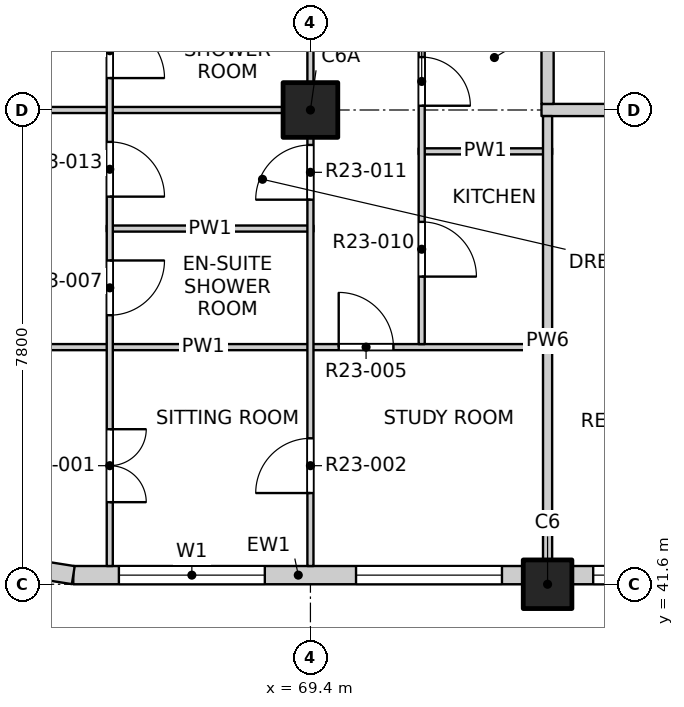
"""IFC4 building model, lengths in metres.
Left out: names, types, materials, properties, quantities, classifications, styles, units other than length and angle.
Written with IfcOpenShell. Run it as: python <this file> out.ifc"""

import sys

from ifc_helpers import new_model, si_unit, direction, frame, frame_2d, origin, origin_2d, place, context, subcontext, project, spatial, rectangle, extrude, element, fill, save


model = new_model("IFC4")
c1 = context("Model", 3, precision=1e-05, world=origin(), true_north=direction((0.0, 1.0)))
c2 = subcontext(c1, "Body", "Model", "MODEL_VIEW")
j1 = project(units=[si_unit("LENGTHUNIT", "METRE"), si_unit("PLANEANGLEUNIT", "RADIAN")], contexts=[c1])
p1 = place(None, origin())
s1 = spatial("IfcSite", under=j1, at=p1, CompositionType="ELEMENT")
p2 = place(p1, origin())
s2 = spatial("IfcBuilding", under=s1, at=p2, CompositionType="ELEMENT")
p3 = place(p2, frame((0.0, 0.0, 234.7)))
s3 = spatial("IfcBuildingStorey", under=s2, at=p3, CompositionType="ELEMENT", Elevation=234.7)
p4 = place(p3, frame((73.3, 41.6, -0.25), z_axis=(0.0, 0.0, 1.0), x_axis=(1.0, 0.0, 0.0)))
e1 = element("IfcColumn", 1, at=p4, inside=s3, PredefinedType="COLUMN", context=c2, shape_type="SweptSolid", body=[
    extrude(rectangle(XDim=0.8, YDim=0.8, at=origin_2d()), origin(), (0.0, 0.0, 1.0), 3.4),
])
p5 = place(p3, frame((69.4, 49.4, -0.25), z_axis=(0.0, 0.0, 1.0), x_axis=(1.0, 0.0, 0.0)))
e2 = element("IfcColumn", 2, at=p5, inside=s3, PredefinedType="COLUMN", context=c2, shape_type="SweptSolid", body=[
    extrude(rectangle(XDim=0.9, YDim=0.9, at=origin_2d()), origin(), (0.0, 0.0, 1.0), 3.4),
])
p6 = place(p3, frame((65.5, 41.75, 0.0), z_axis=(0.0, 0.0, 1.0), x_axis=(1.0, 0.0, 0.0)))
e3 = element("IfcWall", 3, at=p6, inside=s3, PredefinedType="SOLIDWALL", context=c2, shape_type="SweptSolid", body=[
    extrude(rectangle(XDim=7.4, YDim=0.3, at=frame_2d((3.7, 0.0))), origin(), (0.0, 0.0, 1.0), 2.7),
])
p7 = place(p6, frame((0.75, 0.0, 0.9)))
e4 = element("IfcOpeningElement", 4, at=p7, cuts=e3, PredefinedType="OPENING", context=c2, shape_type="SweptSolid", body=[
    extrude(rectangle(XDim=2.4, YDim=1.8, at=frame_2d((1.2, 0.9))), frame((0.0, 0.16, 0.0), z_axis=(0.0, -1.0, 0.0), x_axis=(1.0, 0.0, 0.0)), (0.0, 0.0, 1.0), 0.32),
])
p8 = place(p6, frame((4.65, 0.0, 0.9)))
e5 = element("IfcOpeningElement", 5, at=p8, cuts=e3, PredefinedType="OPENING", context=c2, shape_type="SweptSolid", body=[
    extrude(rectangle(XDim=2.4, YDim=1.8, at=frame_2d((1.2, 0.9))), frame((0.0, 0.16, 0.0), z_axis=(0.0, -1.0, 0.0), x_axis=(1.0, 0.0, 0.0)), (0.0, 0.0, 1.0), 0.32),
])
p9 = place(p3, frame((73.7, 41.75, 0.0), z_axis=(0.0, 0.0, 1.0), x_axis=(1.0, 0.0, 0.0)))
e6 = element("IfcWall", 6, at=p9, inside=s3, PredefinedType="SOLIDWALL", context=c2, shape_type="SweptSolid", body=[
    extrude(rectangle(XDim=7.0, YDim=0.3, at=frame_2d((3.5, 0.0))), origin(), (0.0, 0.0, 1.0), 2.7),
])
p10 = place(p9, frame((0.35, 0.0, 0.9)))
e7 = element("IfcOpeningElement", 7, at=p10, cuts=e6, PredefinedType="OPENING", context=c2, shape_type="SweptSolid", body=[
    extrude(rectangle(XDim=2.4, YDim=1.8, at=frame_2d((1.2, 0.9))), frame((0.0, 0.16, 0.0), z_axis=(0.0, -1.0, 0.0), x_axis=(1.0, 0.0, 0.0)), (0.0, 0.0, 1.0), 0.32),
])
p11 = place(p9, frame((4.25, 0.0, 0.9)))
e8 = element("IfcOpeningElement", 8, at=p11, cuts=e6, PredefinedType="OPENING", context=c2, shape_type="SweptSolid", body=[
    extrude(rectangle(XDim=2.4, YDim=1.8, at=frame_2d((1.2, 0.9))), frame((0.0, 0.16, 0.0), z_axis=(0.0, -1.0, 0.0), x_axis=(1.0, 0.0, 0.0)), (0.0, 0.0, 1.0), 0.32),
])
p12 = place(p3, frame((64.341, 41.934, 0.0), z_axis=(0.0, 0.0, 1.0), x_axis=(0.987678452879, -0.156496880861, 0.0)))
e9 = element("IfcWall", 9, at=p12, inside=s3, PredefinedType="SOLIDWALL", context=c2, shape_type="SweptSolid", body=[
    extrude(rectangle(XDim=1.173, YDim=0.3, at=frame_2d((0.586, 0.0))), origin(), (0.0, 0.0, 1.0), 2.7),
])
p13 = place(p3, frame((61.9, 45.5, 0.0), z_axis=(0.0, 0.0, 1.0), x_axis=(1.0, 0.0, 0.0)))
e10 = element("IfcWall", 10, at=p13, inside=s3, PredefinedType="PARTITIONING", context=c2, shape_type="SweptSolid", body=[
    extrude(rectangle(XDim=11.475, YDim=0.1, at=frame_2d((5.737, 0.0))), origin(), (0.0, 0.0, 1.0), 3.15),
])
p14 = place(p13, frame((7.965, 0.0, 0.0)))
e11 = element("IfcOpeningElement", 11, at=p14, cuts=e10, PredefinedType="OPENING", context=c2, shape_type="SweptSolid", body=[
    extrude(rectangle(XDim=0.9, YDim=2.1, at=frame_2d((0.45, 1.05))), frame((0.0, 0.06, 0.0), z_axis=(0.0, -1.0, 0.0), x_axis=(1.0, 0.0, 0.0)), (0.0, 0.0, 1.0), 0.12),
])
p15 = place(p3, frame((66.05, 47.45, 0.0), z_axis=(0.0, 0.0, 1.0), x_axis=(1.0, 0.0, 0.0)))
e12 = element("IfcWall", 12, at=p15, inside=s3, PredefinedType="PARTITIONING", context=c2, shape_type="SweptSolid", body=[
    extrude(rectangle(XDim=3.4, YDim=0.1, at=frame_2d((1.7, 0.0))), origin(), (0.0, 0.0, 1.0), 3.15),
])
p16 = place(p3, frame((71.18, 48.72, 0.0), z_axis=(0.0, 0.0, 1.0), x_axis=(1.0, 0.0, 0.0)))
e13 = element("IfcWall", 13, at=p16, inside=s3, PredefinedType="PARTITIONING", context=c2, shape_type="SweptSolid", body=[
    extrude(rectangle(XDim=2.195, YDim=0.1, at=frame_2d((1.097, 0.0))), origin(), (0.0, 0.0, 1.0), 3.15),
])
p17 = place(p3, frame((61.9, 49.4, 0.0), z_axis=(0.0, 0.0, 1.0), x_axis=(1.0, 0.0, 0.0)))
e14 = element("IfcWall", 14, at=p17, inside=s3, PredefinedType="PARTITIONING", context=c2, shape_type="SweptSolid", body=[
    extrude(rectangle(XDim=7.55, YDim=0.1, at=frame_2d((3.775, 0.0))), origin(), (0.0, 0.0, 1.0), 3.15),
])
p18 = place(p3, frame((73.2, 49.4, 0.0), z_axis=(0.0, 0.0, 1.0), x_axis=(1.0, 0.0, 0.0)))
e15 = element("IfcWall", 15, at=p18, inside=s3, PredefinedType="PARTITIONING", context=c2, shape_type="SweptSolid", body=[
    extrude(rectangle(XDim=23.6, YDim=0.2, at=frame_2d((11.8, 0.0))), origin(), (0.0, 0.0, 1.0), 3.15),
])
p19 = place(p18, frame((2.25, 0.0, 0.0)))
e16 = element("IfcOpeningElement", 16, at=p19, cuts=e15, PredefinedType="OPENING", context=c2, shape_type="SweptSolid", body=[
    extrude(rectangle(XDim=1.2, YDim=2.1, at=frame_2d((0.6, 1.05))), frame((0.0, 0.11, 0.0), z_axis=(0.0, -1.0, 0.0), x_axis=(1.0, 0.0, 0.0)), (0.0, 0.0, 1.0), 0.22),
])
p20 = place(p18, frame((9.4, 0.0, 0.0)))
e17 = element("IfcOpeningElement", 17, at=p20, cuts=e15, PredefinedType="OPENING", context=c2, shape_type="SweptSolid", body=[
    extrude(rectangle(XDim=0.9, YDim=2.1, at=frame_2d((0.45, 1.05))), frame((0.0, 0.11, 0.0), z_axis=(0.0, -1.0, 0.0), x_axis=(1.0, 0.0, 0.0)), (0.0, 0.0, 1.0), 0.22),
])
p21 = place(p18, frame((15.1, 0.0, 0.0)))
e18 = element("IfcOpeningElement", 18, at=p21, cuts=e15, PredefinedType="OPENING", context=c2, shape_type="SweptSolid", body=[
    extrude(rectangle(XDim=1.2, YDim=2.1, at=frame_2d((0.6, 1.05))), frame((0.0, 0.11, 0.0), z_axis=(0.0, -1.0, 0.0), x_axis=(1.0, 0.0, 0.0)), (0.0, 0.0, 1.0), 0.22),
])
p22 = place(p18, frame((21.1, 0.0, 0.0)))
e19 = element("IfcOpeningElement", 19, at=p22, cuts=e15, PredefinedType="OPENING", context=c2, shape_type="SweptSolid", body=[
    extrude(rectangle(XDim=0.9, YDim=2.1, at=frame_2d((0.45, 1.05))), frame((0.0, 0.11, 0.0), z_axis=(0.0, -1.0, 0.0), x_axis=(1.0, 0.0, 0.0)), (0.0, 0.0, 1.0), 0.22),
])
p23 = place(p3, frame((66.1, 41.9, 0.0), z_axis=(0.0, 0.0, 1.0), x_axis=(0.0, 1.0, 0.0)))
e20 = element("IfcWall", 20, at=p23, inside=s3, PredefinedType="PARTITIONING", context=c2, shape_type="SweptSolid", body=[
    extrude(rectangle(XDim=19.1, YDim=0.1, at=frame_2d((9.55, 0.0))), origin(), (0.0, 0.0, 1.0), 3.15),
])
p24 = place(p23, frame((1.05, 0.0, 0.0)))
e21 = element("IfcOpeningElement", 21, at=p24, cuts=e20, PredefinedType="OPENING", context=c2, shape_type="SweptSolid", body=[
    extrude(rectangle(XDim=1.2, YDim=2.1, at=frame_2d((0.6, 1.05))), frame((0.0, 0.06, 0.0), z_axis=(0.0, -1.0, 0.0), x_axis=(1.0, 0.0, 0.0)), (0.0, 0.0, 1.0), 0.12),
])
p25 = place(p23, frame((4.125, 0.0, 0.0)))
e22 = element("IfcOpeningElement", 22, at=p25, cuts=e20, PredefinedType="OPENING", context=c2, shape_type="SweptSolid", body=[
    extrude(rectangle(XDim=0.9, YDim=2.1, at=frame_2d((0.45, 1.05))), frame((0.0, 0.06, 0.0), z_axis=(0.0, -1.0, 0.0), x_axis=(1.0, 0.0, 0.0)), (0.0, 0.0, 1.0), 0.12),
])
p26 = place(p23, frame((6.075, 0.0, 0.0)))
e23 = element("IfcOpeningElement", 23, at=p26, cuts=e20, PredefinedType="OPENING", context=c2, shape_type="SweptSolid", body=[
    extrude(rectangle(XDim=0.9, YDim=2.1, at=frame_2d((0.45, 1.05))), frame((0.0, 0.06, 0.0), z_axis=(0.0, -1.0, 0.0), x_axis=(1.0, 0.0, 0.0)), (0.0, 0.0, 1.0), 0.12),
])
p27 = place(p23, frame((8.025, 0.0, 0.0)))
e24 = element("IfcOpeningElement", 24, at=p27, cuts=e20, PredefinedType="OPENING", context=c2, shape_type="SweptSolid", body=[
    extrude(rectangle(XDim=0.9, YDim=2.1, at=frame_2d((0.45, 1.05))), frame((0.0, 0.06, 0.0), z_axis=(0.0, -1.0, 0.0), x_axis=(1.0, 0.0, 0.0)), (0.0, 0.0, 1.0), 0.12),
])
p28 = place(p23, frame((9.975, 0.0, 0.0)))
e25 = element("IfcOpeningElement", 25, at=p28, cuts=e20, PredefinedType="OPENING", context=c2, shape_type="SweptSolid", body=[
    extrude(rectangle(XDim=0.9, YDim=2.1, at=frame_2d((0.45, 1.05))), frame((0.0, 0.06, 0.0), z_axis=(0.0, -1.0, 0.0), x_axis=(1.0, 0.0, 0.0)), (0.0, 0.0, 1.0), 0.12),
])
p29 = place(p23, frame((12.75, 0.0, 0.0)))
e26 = element("IfcOpeningElement", 26, at=p29, cuts=e20, PredefinedType="OPENING", context=c2, shape_type="SweptSolid", body=[
    extrude(rectangle(XDim=1.2, YDim=2.1, at=frame_2d((0.6, 1.05))), frame((0.0, 0.06, 0.0), z_axis=(0.0, -1.0, 0.0), x_axis=(1.0, 0.0, 0.0)), (0.0, 0.0, 1.0), 0.12),
])
p30 = place(p23, frame((15.825, 0.0, 0.0)))
e27 = element("IfcOpeningElement", 27, at=p30, cuts=e20, PredefinedType="OPENING", context=c2, shape_type="SweptSolid", body=[
    extrude(rectangle(XDim=0.9, YDim=2.1, at=frame_2d((0.45, 1.05))), frame((0.0, 0.06, 0.0), z_axis=(0.0, -1.0, 0.0), x_axis=(1.0, 0.0, 0.0)), (0.0, 0.0, 1.0), 0.12),
])
p31 = place(p23, frame((17.775, 0.0, 0.0)))
e28 = element("IfcOpeningElement", 28, at=p31, cuts=e20, PredefinedType="OPENING", context=c2, shape_type="SweptSolid", body=[
    extrude(rectangle(XDim=0.9, YDim=2.1, at=frame_2d((0.45, 1.05))), frame((0.0, 0.06, 0.0), z_axis=(0.0, -1.0, 0.0), x_axis=(1.0, 0.0, 0.0)), (0.0, 0.0, 1.0), 0.12),
])
p32 = place(p3, frame((69.4, 41.9, 0.0), z_axis=(0.0, 0.0, 1.0), x_axis=(0.0, 1.0, 0.0)))
e29 = element("IfcWall", 29, at=p32, inside=s3, PredefinedType="PARTITIONING", context=c2, shape_type="SweptSolid", body=[
    extrude(rectangle(XDim=46.2, YDim=0.1, at=frame_2d((23.1, 0.0))), origin(), (0.0, 0.0, 1.0), 3.15),
])
p33 = place(p32, frame((1.2, 0.0, 0.0)))
e30 = element("IfcOpeningElement", 30, at=p33, cuts=e29, PredefinedType="OPENING", context=c2, shape_type="SweptSolid", body=[
    extrude(rectangle(XDim=0.9, YDim=2.1, at=frame_2d((0.45, 1.05))), frame((0.0, 0.06, 0.0), z_axis=(0.0, -1.0, 0.0), x_axis=(1.0, 0.0, 0.0)), (0.0, 0.0, 1.0), 0.12),
])
p34 = place(p32, frame((6.025, 0.0, 0.0)))
e31 = element("IfcOpeningElement", 31, at=p34, cuts=e29, PredefinedType="OPENING", context=c2, shape_type="SweptSolid", body=[
    extrude(rectangle(XDim=0.9, YDim=2.1, at=frame_2d((0.45, 1.05))), frame((0.0, 0.06, 0.0), z_axis=(0.0, -1.0, 0.0), x_axis=(1.0, 0.0, 0.0)), (0.0, 0.0, 1.0), 0.12),
])
p35 = place(p32, frame((9.975, 0.0, 0.0)))
e32 = element("IfcOpeningElement", 32, at=p35, cuts=e29, PredefinedType="OPENING", context=c2, shape_type="SweptSolid", body=[
    extrude(rectangle(XDim=0.9, YDim=2.1, at=frame_2d((0.45, 1.05))), frame((0.0, 0.06, 0.0), z_axis=(0.0, -1.0, 0.0), x_axis=(1.0, 0.0, 0.0)), (0.0, 0.0, 1.0), 0.12),
])
p36 = place(p32, frame((12.9, 0.0, 0.0)))
e33 = element("IfcOpeningElement", 33, at=p36, cuts=e29, PredefinedType="OPENING", context=c2, shape_type="SweptSolid", body=[
    extrude(rectangle(XDim=0.9, YDim=2.1, at=frame_2d((0.45, 1.05))), frame((0.0, 0.06, 0.0), z_axis=(0.0, -1.0, 0.0), x_axis=(1.0, 0.0, 0.0)), (0.0, 0.0, 1.0), 0.12),
])
p37 = place(p32, frame((17.775, 0.0, 0.0)))
e34 = element("IfcOpeningElement", 34, at=p37, cuts=e29, PredefinedType="OPENING", context=c2, shape_type="SweptSolid", body=[
    extrude(rectangle(XDim=0.9, YDim=2.1, at=frame_2d((0.45, 1.05))), frame((0.0, 0.06, 0.0), z_axis=(0.0, -1.0, 0.0), x_axis=(1.0, 0.0, 0.0)), (0.0, 0.0, 1.0), 0.12),
])
p38 = place(p32, frame((21.625, 0.0, 0.0)))
e35 = element("IfcOpeningElement", 35, at=p38, cuts=e29, PredefinedType="OPENING", context=c2, shape_type="SweptSolid", body=[
    extrude(rectangle(XDim=0.9, YDim=2.1, at=frame_2d((0.45, 1.05))), frame((0.0, 0.06, 0.0), z_axis=(0.0, -1.0, 0.0), x_axis=(1.0, 0.0, 0.0)), (0.0, 0.0, 1.0), 0.12),
])
p39 = place(p32, frame((25.575, 0.0, 0.0)))
e36 = element("IfcOpeningElement", 36, at=p39, cuts=e29, PredefinedType="OPENING", context=c2, shape_type="SweptSolid", body=[
    extrude(rectangle(XDim=0.9, YDim=2.1, at=frame_2d((0.45, 1.05))), frame((0.0, 0.06, 0.0), z_axis=(0.0, -1.0, 0.0), x_axis=(1.0, 0.0, 0.0)), (0.0, 0.0, 1.0), 0.12),
])
p40 = place(p32, frame((28.5, 0.0, 0.0)))
e37 = element("IfcOpeningElement", 37, at=p40, cuts=e29, PredefinedType="OPENING", context=c2, shape_type="SweptSolid", body=[
    extrude(rectangle(XDim=0.9, YDim=2.1, at=frame_2d((0.45, 1.05))), frame((0.0, 0.06, 0.0), z_axis=(0.0, -1.0, 0.0), x_axis=(1.0, 0.0, 0.0)), (0.0, 0.0, 1.0), 0.12),
])
p41 = place(p32, frame((32.4, 0.0, 0.0)))
e38 = element("IfcOpeningElement", 38, at=p41, cuts=e29, PredefinedType="OPENING", context=c2, shape_type="SweptSolid", body=[
    extrude(rectangle(XDim=0.9, YDim=2.1, at=frame_2d((0.45, 1.05))), frame((0.0, 0.06, 0.0), z_axis=(0.0, -1.0, 0.0), x_axis=(1.0, 0.0, 0.0)), (0.0, 0.0, 1.0), 0.12),
])
p42 = place(p32, frame((36.3, 0.0, 0.0)))
e39 = element("IfcOpeningElement", 39, at=p42, cuts=e29, PredefinedType="OPENING", context=c2, shape_type="SweptSolid", body=[
    extrude(rectangle(XDim=0.9, YDim=2.1, at=frame_2d((0.45, 1.05))), frame((0.0, 0.06, 0.0), z_axis=(0.0, -1.0, 0.0), x_axis=(1.0, 0.0, 0.0)), (0.0, 0.0, 1.0), 0.12),
])
p43 = place(p32, frame((40.2, 0.0, 0.0)))
e40 = element("IfcOpeningElement", 40, at=p43, cuts=e29, PredefinedType="OPENING", context=c2, shape_type="SweptSolid", body=[
    extrude(rectangle(XDim=0.9, YDim=2.1, at=frame_2d((0.45, 1.05))), frame((0.0, 0.06, 0.0), z_axis=(0.0, -1.0, 0.0), x_axis=(1.0, 0.0, 0.0)), (0.0, 0.0, 1.0), 0.12),
])
p44 = place(p32, frame((44.1, 0.0, 0.0)))
e41 = element("IfcOpeningElement", 41, at=p44, cuts=e29, PredefinedType="OPENING", context=c2, shape_type="SweptSolid", body=[
    extrude(rectangle(XDim=0.9, YDim=2.1, at=frame_2d((0.45, 1.05))), frame((0.0, 0.06, 0.0), z_axis=(0.0, -1.0, 0.0), x_axis=(1.0, 0.0, 0.0)), (0.0, 0.0, 1.0), 0.12),
])
p45 = place(p3, frame((71.23, 45.55, 0.0), z_axis=(0.0, 0.0, 1.0), x_axis=(0.0, 1.0, 0.0)))
e42 = element("IfcWall", 42, at=p45, inside=s3, PredefinedType="PARTITIONING", context=c2, shape_type="SweptSolid", body=[
    extrude(rectangle(XDim=8.15, YDim=0.1, at=frame_2d((4.075, 0.0))), origin(), (0.0, 0.0, 1.0), 3.15),
])
p46 = place(p45, frame((1.11, 0.0, 0.0)))
e43 = element("IfcOpeningElement", 43, at=p46, cuts=e42, PredefinedType="OPENING", context=c2, shape_type="SweptSolid", body=[
    extrude(rectangle(XDim=0.9, YDim=2.1, at=frame_2d((0.45, 1.05))), frame((0.0, 0.06, 0.0), z_axis=(0.0, -1.0, 0.0), x_axis=(1.0, 0.0, 0.0)), (0.0, 0.0, 1.0), 0.12),
])
p47 = place(p45, frame((3.92, 0.0, 0.0)))
e44 = element("IfcOpeningElement", 44, at=p47, cuts=e42, PredefinedType="OPENING", context=c2, shape_type="SweptSolid", body=[
    extrude(rectangle(XDim=0.8, YDim=2.1, at=frame_2d((0.4, 1.05))), frame((0.0, 0.06, 0.0), z_axis=(0.0, -1.0, 0.0), x_axis=(1.0, 0.0, 0.0)), (0.0, 0.0, 1.0), 0.12),
])
p48 = place(p45, frame((6.435, 0.0, 0.0)))
e45 = element("IfcOpeningElement", 45, at=p48, cuts=e42, PredefinedType="OPENING", context=c2, shape_type="SweptSolid", body=[
    extrude(rectangle(XDim=0.8, YDim=2.1, at=frame_2d((0.4, 1.05))), frame((0.0, 0.06, 0.0), z_axis=(0.0, -1.0, 0.0), x_axis=(1.0, 0.0, 0.0)), (0.0, 0.0, 1.0), 0.12),
])
p49 = place(p3, frame((73.3, 41.9, 0.0), z_axis=(0.0, 0.0, 1.0), x_axis=(0.0, 1.0, 0.0)))
e46 = element("IfcWall", 46, at=p49, inside=s3, PredefinedType="PARTITIONING", context=c2, shape_type="SweptSolid", body=[
    extrude(rectangle(XDim=7.4, YDim=0.15, at=frame_2d((3.7, 0.0))), origin(), (0.0, 0.0, 1.0), 3.15),
])
p50 = place(p3, frame((73.3, 49.5, 0.0), z_axis=(0.0, 0.0, 1.0), x_axis=(0.0, 1.0, 0.0)))
e47 = element("IfcWall", 47, at=p50, inside=s3, PredefinedType="PARTITIONING", context=c2, shape_type="SweptSolid", body=[
    extrude(rectangle(XDim=34.9, YDim=0.2, at=frame_2d((17.45, 0.0))), origin(), (0.0, 0.0, 1.0), 3.15),
])
p51 = place(p50, frame((3.075, 0.0, 0.0)))
e48 = element("IfcOpeningElement", 48, at=p51, cuts=e47, PredefinedType="OPENING", context=c2, shape_type="SweptSolid", body=[
    extrude(rectangle(XDim=1.0, YDim=2.1, at=frame_2d((0.5, 1.05))), frame((0.0, 0.11, 0.0), z_axis=(0.0, -1.0, 0.0), x_axis=(1.0, 0.0, 0.0)), (0.0, 0.0, 1.0), 0.22),
])
p52 = place(p50, frame((14.575, 0.0, 0.0)))
e49 = element("IfcOpeningElement", 49, at=p52, cuts=e47, PredefinedType="OPENING", context=c2, shape_type="SweptSolid", body=[
    extrude(rectangle(XDim=1.0, YDim=2.1, at=frame_2d((0.5, 1.05))), frame((0.0, 0.11, 0.0), z_axis=(0.0, -1.0, 0.0), x_axis=(1.0, 0.0, 0.0)), (0.0, 0.0, 1.0), 0.22),
])
p53 = place(p50, frame((33.625, 0.0, 0.0)))
e50 = element("IfcOpeningElement", 50, at=p53, cuts=e47, PredefinedType="OPENING", context=c2, shape_type="SweptSolid", body=[
    extrude(rectangle(XDim=1.0, YDim=2.1, at=frame_2d((0.5, 1.05))), frame((0.0, 0.11, 0.0), z_axis=(0.0, -1.0, 0.0), x_axis=(1.0, 0.0, 0.0)), (0.0, 0.0, 1.0), 0.22),
])
p54 = place(p7, origin())
e51 = element("IfcWindow", 51, at=p54, inside=s3, PartitioningType="DOUBLE_PANEL_VERTICAL", PredefinedType="WINDOW", context=c2, shape_type="SweptSolid", body=[
    extrude(rectangle(XDim=2.4, YDim=1.8, at=frame_2d((1.2, 0.9))), frame((0.0, 0.03, 0.0), z_axis=(0.0, -1.0, 0.0), x_axis=(1.0, 0.0, 0.0)), (0.0, 0.0, 1.0), 0.06),
])
fill(e4, e51)
p55 = place(p8, origin())
e52 = element("IfcWindow", 52, at=p55, inside=s3, PartitioningType="DOUBLE_PANEL_VERTICAL", PredefinedType="WINDOW", context=c2, shape_type="SweptSolid", body=[
    extrude(rectangle(XDim=2.4, YDim=1.8, at=frame_2d((1.2, 0.9))), frame((0.0, 0.03, 0.0), z_axis=(0.0, -1.0, 0.0), x_axis=(1.0, 0.0, 0.0)), (0.0, 0.0, 1.0), 0.06),
])
fill(e5, e52)
p56 = place(p10, origin())
e53 = element("IfcWindow", 53, at=p56, inside=s3, PartitioningType="DOUBLE_PANEL_VERTICAL", PredefinedType="WINDOW", context=c2, shape_type="SweptSolid", body=[
    extrude(rectangle(XDim=2.4, YDim=1.8, at=frame_2d((1.2, 0.9))), frame((0.0, 0.03, 0.0), z_axis=(0.0, -1.0, 0.0), x_axis=(1.0, 0.0, 0.0)), (0.0, 0.0, 1.0), 0.06),
])
fill(e7, e53)
p57 = place(p24, origin())
e54 = element("IfcDoor", 54, at=p57, inside=s3, OperationType="DOUBLE_DOOR_SINGLE_SWING", PredefinedType="DOOR", context=c2, shape_type="SweptSolid", body=[
    extrude(rectangle(XDim=1.2, YDim=2.1, at=frame_2d((0.6, 1.05))), frame((0.0, 0.025, 0.0), z_axis=(0.0, -1.0, 0.0), x_axis=(1.0, 0.0, 0.0)), (0.0, 0.0, 1.0), 0.05),
])
fill(e21, e54)
p58 = place(p33, origin())
e55 = element("IfcDoor", 55, at=p58, inside=s3, OperationType="SINGLE_SWING_LEFT", PredefinedType="DOOR", context=c2, shape_type="SweptSolid", body=[
    extrude(rectangle(XDim=0.9, YDim=2.1, at=frame_2d((0.45, 1.05))), frame((0.0, 0.025, 0.0), z_axis=(0.0, -1.0, 0.0), x_axis=(1.0, 0.0, 0.0)), (0.0, 0.0, 1.0), 0.05),
])
fill(e30, e55)
p59 = place(p14, origin())
e56 = element("IfcDoor", 56, at=p59, inside=s3, OperationType="SINGLE_SWING_LEFT", PredefinedType="DOOR", context=c2, shape_type="SweptSolid", body=[
    extrude(rectangle(XDim=0.9, YDim=2.1, at=frame_2d((0.45, 1.05))), frame((0.0, 0.025, 0.0), z_axis=(0.0, -1.0, 0.0), x_axis=(1.0, 0.0, 0.0)), (0.0, 0.0, 1.0), 0.05),
])
fill(e11, e56)
p60 = place(p25, origin())
e57 = element("IfcDoor", 57, at=p60, inside=s3, OperationType="SINGLE_SWING_LEFT", PredefinedType="DOOR", context=c2, shape_type="SweptSolid", body=[
    extrude(rectangle(XDim=0.9, YDim=2.1, at=frame_2d((0.45, 1.05))), frame((0.0, 0.025, 0.0), z_axis=(0.0, -1.0, 0.0), x_axis=(1.0, 0.0, 0.0)), (0.0, 0.0, 1.0), 0.05),
])
fill(e22, e57)
p61 = place(p46, origin())
e58 = element("IfcDoor", 58, at=p61, inside=s3, OperationType="SINGLE_SWING_RIGHT", PredefinedType="DOOR", context=c2, shape_type="SweptSolid", body=[
    extrude(rectangle(XDim=0.9, YDim=2.1, at=frame_2d((0.45, 1.05))), frame((0.0, 0.025, 0.0), z_axis=(0.0, -1.0, 0.0), x_axis=(1.0, 0.0, 0.0)), (0.0, 0.0, 1.0), 0.05),
])
fill(e43, e58)
p62 = place(p34, origin())
e59 = element("IfcDoor", 59, at=p62, inside=s3, OperationType="SINGLE_SWING_LEFT", PredefinedType="DOOR", context=c2, shape_type="SweptSolid", body=[
    extrude(rectangle(XDim=0.9, YDim=2.1, at=frame_2d((0.45, 1.05))), frame((0.0, 0.025, 0.0), z_axis=(0.0, -1.0, 0.0), x_axis=(1.0, 0.0, 0.0)), (0.0, 0.0, 1.0), 0.05),
])
fill(e31, e59)
p63 = place(p26, origin())
e60 = element("IfcDoor", 60, at=p63, inside=s3, OperationType="SINGLE_SWING_RIGHT", PredefinedType="DOOR", context=c2, shape_type="SweptSolid", body=[
    extrude(rectangle(XDim=0.9, YDim=2.1, at=frame_2d((0.45, 1.05))), frame((0.0, 0.025, 0.0), z_axis=(0.0, -1.0, 0.0), x_axis=(1.0, 0.0, 0.0)), (0.0, 0.0, 1.0), 0.05),
])
fill(e23, e60)
p64 = place(p47, origin())
e61 = element("IfcDoor", 61, at=p64, inside=s3, OperationType="SINGLE_SWING_RIGHT", PredefinedType="DOOR", context=c2, shape_type="SweptSolid", body=[
    extrude(rectangle(XDim=0.8, YDim=2.1, at=frame_2d((0.4, 1.05))), frame((0.0, 0.025, 0.0), z_axis=(0.0, -1.0, 0.0), x_axis=(1.0, 0.0, 0.0)), (0.0, 0.0, 1.0), 0.05),
])
fill(e44, e61)
p65 = place(p27, origin())
e62 = element("IfcDoor", 62, at=p65, inside=s3, OperationType="SINGLE_SWING_RIGHT", PredefinedType="DOOR", context=c2, shape_type="SweptSolid", body=[
    extrude(rectangle(XDim=0.9, YDim=2.1, at=frame_2d((0.45, 1.05))), frame((0.0, 0.025, 0.0), z_axis=(0.0, -1.0, 0.0), x_axis=(1.0, 0.0, 0.0)), (0.0, 0.0, 1.0), 0.05),
])
fill(e24, e62)
save(model, sys.argv[1])
